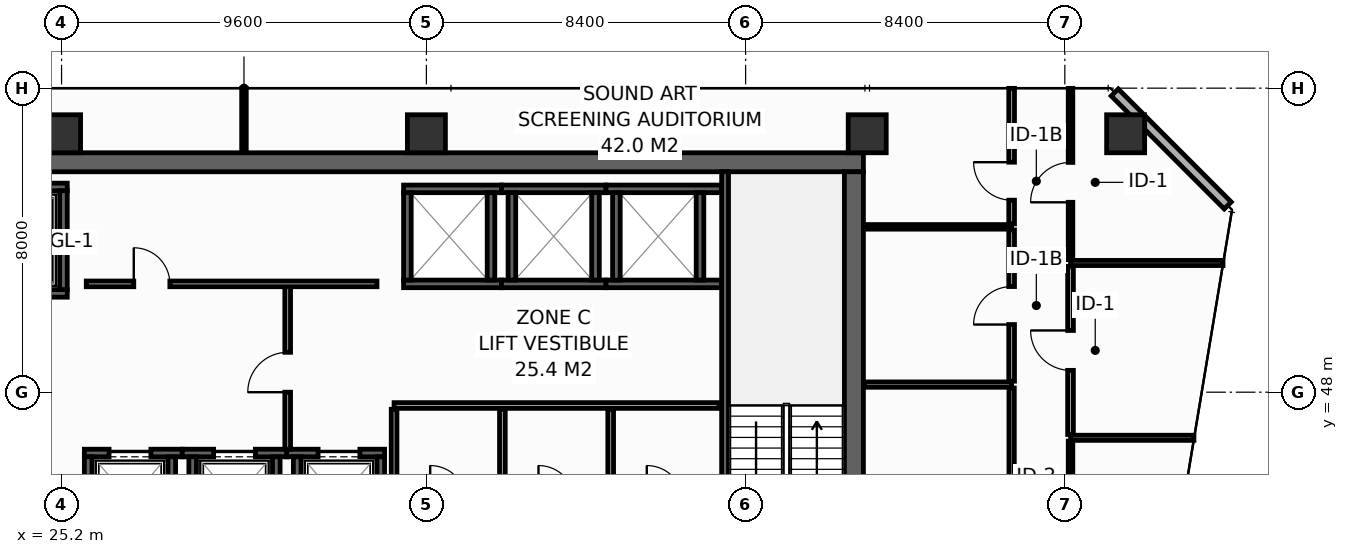
"""IFC4 building model, lengths in metres.
Left out: names, types, materials, properties, quantities, classifications, styles, units other than length and angle.
Written with IfcOpenShell. Run it as: python <this file> out.ifc"""

import sys

from ifc_helpers import new_model, si_unit, direction, frame, frame_2d, origin, origin_2d, place, context, subcontext, project, spatial, rectangle, hollow_rectangle, extrude, element, fill, save


model = new_model("IFC4")
c1 = context("Model", 3, precision=1e-05, world=origin(), true_north=direction((0.0, 1.0)))
c2 = subcontext(c1, "Body", "Model", "MODEL_VIEW")
j1 = project(units=[si_unit("LENGTHUNIT", "METRE"), si_unit("PLANEANGLEUNIT", "RADIAN")], contexts=[c1])
p1 = place(None, origin())
s1 = spatial("IfcSite", under=j1, at=p1, CompositionType="ELEMENT")
p2 = place(p1, origin())
s2 = spatial("IfcBuilding", under=s1, at=p2, CompositionType="ELEMENT")
p3 = place(p2, frame((0.0, 0.0, 144.8)))
s3 = spatial("IfcBuildingStorey", under=s2, at=p3, CompositionType="ELEMENT", Elevation=144.8)
p4 = place(p3, frame((13.6, 54.05, 0.0), z_axis=(0.0, 0.0, 1.0), x_axis=(1.0, 0.0, 0.0)))
e1 = element("IfcWall", 1, at=p4, inside=s3, PredefinedType="SHEAR", context=c2, shape_type="SweptSolid", body=[
    extrude(rectangle(XDim=32.7, YDim=0.5, at=frame_2d((16.35, 0.0))), origin(), (0.0, 0.0, 1.0), 3.55),
])
p5 = place(p3, frame((46.05, 43.4, 0.0), z_axis=(0.0, 0.0, 1.0), x_axis=(0.0, 1.0, 0.0)))
e2 = element("IfcWall", 2, at=p5, inside=s3, PredefinedType="SHEAR", context=c2, shape_type="SweptSolid", body=[
    extrude(rectangle(XDim=10.4, YDim=0.5, at=frame_2d((5.2, 0.0))), origin(), (0.0, 0.0, 1.0), 3.55),
])
for number, where, z_axis, x_axis in (
    (3, (25.2, 54.8, 0.0), (0.0, 0.0, 1.0), (1.0, 0.0, 0.0)),
    (4, (34.8, 54.8, 0.0), (0.0, 0.0, 1.0), (1.0, 0.0, 0.0)),
    (5, (46.4, 54.8, 0.0), (0.0, 0.0, 1.0), (1.0, 0.0, 0.0)),
    (6, (53.2, 54.8, 0.0), (0.0, 0.0, 1.0), (1.0, 0.0, 0.0)),
):
    element("IfcColumn", number, at=place(p3, frame(where, z_axis=z_axis, x_axis=x_axis)), inside=s3, PredefinedType="COLUMN", context=c2, shape_type="SweptSolid", body=[
        extrude(hollow_rectangle(XDim=1.0, YDim=1.0, WallThickness=0.045, at=origin_2d()), origin(), (0.0, 0.0, 1.0), 3.8),
    ])
p6 = place(p3, frame((22.5, 50.6, 0.0), z_axis=(0.0, 0.0, 1.0), x_axis=(1.0, 0.0, 0.0)))
e7 = element("IfcWall", 7, at=p6, inside=s3, PredefinedType="SHEAR", context=c2, shape_type="SweptSolid", body=[
    extrude(rectangle(XDim=2.85, YDim=0.2, at=frame_2d((1.425, 0.0))), origin(), (0.0, 0.0, 1.0), 3.55),
])
p7 = place(p6, frame((0.925, 0.0, 0.0)))
e8 = element("IfcOpeningElement", 8, at=p7, cuts=e7, PredefinedType="OPENING", context=c2, shape_type="SweptSolid", body=[
    extrude(rectangle(XDim=1.25, YDim=2.3, at=frame_2d((0.625, 1.15))), frame((0.0, 0.11, 0.0), z_axis=(0.0, -1.0, 0.0), x_axis=(1.0, 0.0, 0.0)), (0.0, 0.0, 1.0), 0.22),
])
p8 = place(p3, frame((22.5, 53.4, 0.0), z_axis=(0.0, 0.0, 1.0), x_axis=(1.0, 0.0, 0.0)))
e9 = element("IfcWall", 9, at=p8, inside=s3, PredefinedType="SHEAR", context=c2, shape_type="SweptSolid", body=[
    extrude(rectangle(XDim=2.85, YDim=0.2, at=frame_2d((1.425, 0.0))), origin(), (0.0, 0.0, 1.0), 3.55),
])
p9 = place(p3, frame((25.25, 50.7, 0.0), z_axis=(0.0, 0.0, 1.0), x_axis=(0.0, 1.0, 0.0)))
e10 = element("IfcWall", 10, at=p9, inside=s3, PredefinedType="SHEAR", context=c2, shape_type="SweptSolid", body=[
    extrude(rectangle(XDim=2.6, YDim=0.2, at=frame_2d((1.3, 0.0))), origin(), (0.0, 0.0, 1.0), 3.55),
])
p10 = place(p3, frame((25.8, 46.4, 0.0), z_axis=(0.0, 0.0, 1.0), x_axis=(1.0, 0.0, 0.0)))
e11 = element("IfcWall", 11, at=p10, inside=s3, PredefinedType="SHEAR", context=c2, shape_type="SweptSolid", body=[
    extrude(rectangle(XDim=2.575, YDim=0.2, at=frame_2d((1.288, 0.0))), origin(), (0.0, 0.0, 1.0), 3.55),
])
p11 = place(p10, frame((0.65, 0.0, 0.0)))
e12 = element("IfcOpeningElement", 12, at=p11, cuts=e11, PredefinedType="OPENING", context=c2, shape_type="SweptSolid", body=[
    extrude(rectangle(XDim=1.1, YDim=2.2, at=frame_2d((0.55, 1.1))), frame((0.0, 0.11, 0.0), z_axis=(0.0, -1.0, 0.0), x_axis=(1.0, 0.0, 0.0)), (0.0, 0.0, 1.0), 0.22),
])
for number, where, z_axis, x_axis in (
    (13, (25.9, 44.0, 0.0), (0.0, 0.0, 1.0), (0.0, 1.0, 0.0)),
    (14, (28.1, 44.0, 0.0), (0.0, 0.0, 1.0), (0.0, 1.0, 0.0)),
):
    element("IfcWall", number, at=place(p3, frame(where, z_axis=z_axis, x_axis=x_axis)), inside=s3, PredefinedType="SHEAR", context=c2, shape_type="SweptSolid", body=[
        extrude(rectangle(XDim=2.3, YDim=0.2, at=frame_2d((1.15, 0.0))), origin(), (0.0, 0.0, 1.0), 3.55),
    ])
p12 = place(p3, frame((28.375, 46.4, 0.0), z_axis=(0.0, 0.0, 1.0), x_axis=(1.0, 0.0, 0.0)))
e15 = element("IfcWall", 15, at=p12, inside=s3, PredefinedType="SHEAR", context=c2, shape_type="SweptSolid", body=[
    extrude(rectangle(XDim=2.75, YDim=0.2, at=frame_2d((1.375, 0.0))), origin(), (0.0, 0.0, 1.0), 3.55),
])
p13 = place(p12, frame((0.825, 0.0, 0.0)))
e16 = element("IfcOpeningElement", 16, at=p13, cuts=e15, PredefinedType="OPENING", context=c2, shape_type="SweptSolid", body=[
    extrude(rectangle(XDim=1.1, YDim=2.2, at=frame_2d((0.55, 1.1))), frame((0.0, 0.11, 0.0), z_axis=(0.0, -1.0, 0.0), x_axis=(1.0, 0.0, 0.0)), (0.0, 0.0, 1.0), 0.22),
])
for number, where, z_axis, x_axis in (
    (17, (28.65, 44.0, 0.0), (0.0, 0.0, 1.0), (0.0, 1.0, 0.0)),
    (18, (30.85, 44.0, 0.0), (0.0, 0.0, 1.0), (0.0, 1.0, 0.0)),
):
    element("IfcWall", number, at=place(p3, frame(where, z_axis=z_axis, x_axis=x_axis)), inside=s3, PredefinedType="SHEAR", context=c2, shape_type="SweptSolid", body=[
        extrude(rectangle(XDim=2.3, YDim=0.2, at=frame_2d((1.15, 0.0))), origin(), (0.0, 0.0, 1.0), 3.55),
    ])
p14 = place(p3, frame((31.125, 46.4, 0.0), z_axis=(0.0, 0.0, 1.0), x_axis=(1.0, 0.0, 0.0)))
e19 = element("IfcWall", 19, at=p14, inside=s3, PredefinedType="SHEAR", context=c2, shape_type="SweptSolid", body=[
    extrude(rectangle(XDim=2.575, YDim=0.2, at=frame_2d((1.288, 0.0))), origin(), (0.0, 0.0, 1.0), 3.55),
])
p15 = place(p14, frame((0.825, 0.0, 0.0)))
e20 = element("IfcOpeningElement", 20, at=p15, cuts=e19, PredefinedType="OPENING", context=c2, shape_type="SweptSolid", body=[
    extrude(rectangle(XDim=1.1, YDim=2.2, at=frame_2d((0.55, 1.1))), frame((0.0, 0.11, 0.0), z_axis=(0.0, -1.0, 0.0), x_axis=(1.0, 0.0, 0.0)), (0.0, 0.0, 1.0), 0.22),
])
for number, where, z_axis, x_axis in (
    (21, (31.4, 44.0, 0.0), (0.0, 0.0, 1.0), (0.0, 1.0, 0.0)),
    (22, (33.6, 44.0, 0.0), (0.0, 0.0, 1.0), (0.0, 1.0, 0.0)),
):
    element("IfcWall", number, at=place(p3, frame(where, z_axis=z_axis, x_axis=x_axis)), inside=s3, PredefinedType="SHEAR", context=c2, shape_type="SweptSolid", body=[
        extrude(rectangle(XDim=2.3, YDim=0.2, at=frame_2d((1.15, 0.0))), origin(), (0.0, 0.0, 1.0), 3.55),
    ])
for number, where, z_axis, x_axis in (
    (23, (34.2, 50.85, 0.0), (0.0, 0.0, 1.0), (1.0, 0.0, 0.0)),
    (24, (34.2, 53.35, 0.0), (0.0, 0.0, 1.0), (1.0, 0.0, 0.0)),
):
    element("IfcWall", number, at=place(p3, frame(where, z_axis=z_axis, x_axis=x_axis)), inside=s3, PredefinedType="SHEAR", context=c2, shape_type="SweptSolid", body=[
        extrude(rectangle(XDim=2.575, YDim=0.2, at=frame_2d((1.288, 0.0))), origin(), (0.0, 0.0, 1.0), 3.55),
    ])
for number, where, z_axis, x_axis in (
    (25, (34.3, 50.95, 0.0), (0.0, 0.0, 1.0), (0.0, 1.0, 0.0)),
    (26, (36.5, 50.95, 0.0), (0.0, 0.0, 1.0), (0.0, 1.0, 0.0)),
):
    element("IfcWall", number, at=place(p3, frame(where, z_axis=z_axis, x_axis=x_axis)), inside=s3, PredefinedType="SHEAR", context=c2, shape_type="SweptSolid", body=[
        extrude(rectangle(XDim=2.3, YDim=0.2, at=frame_2d((1.15, 0.0))), origin(), (0.0, 0.0, 1.0), 3.55),
    ])
for number, where, z_axis, x_axis in (
    (27, (36.775, 50.85, 0.0), (0.0, 0.0, 1.0), (1.0, 0.0, 0.0)),
    (28, (36.775, 53.35, 0.0), (0.0, 0.0, 1.0), (1.0, 0.0, 0.0)),
):
    element("IfcWall", number, at=place(p3, frame(where, z_axis=z_axis, x_axis=x_axis)), inside=s3, PredefinedType="SHEAR", context=c2, shape_type="SweptSolid", body=[
        extrude(rectangle(XDim=2.75, YDim=0.2, at=frame_2d((1.375, 0.0))), origin(), (0.0, 0.0, 1.0), 3.55),
    ])
for number, where, z_axis, x_axis in (
    (29, (37.05, 50.95, 0.0), (0.0, 0.0, 1.0), (0.0, 1.0, 0.0)),
    (30, (39.25, 50.95, 0.0), (0.0, 0.0, 1.0), (0.0, 1.0, 0.0)),
):
    element("IfcWall", number, at=place(p3, frame(where, z_axis=z_axis, x_axis=x_axis)), inside=s3, PredefinedType="SHEAR", context=c2, shape_type="SweptSolid", body=[
        extrude(rectangle(XDim=2.3, YDim=0.2, at=frame_2d((1.15, 0.0))), origin(), (0.0, 0.0, 1.0), 3.55),
    ])
for number, where, z_axis, x_axis in (
    (31, (39.525, 50.85, 0.0), (0.0, 0.0, 1.0), (1.0, 0.0, 0.0)),
    (32, (39.525, 53.35, 0.0), (0.0, 0.0, 1.0), (1.0, 0.0, 0.0)),
):
    element("IfcWall", number, at=place(p3, frame(where, z_axis=z_axis, x_axis=x_axis)), inside=s3, PredefinedType="SHEAR", context=c2, shape_type="SweptSolid", body=[
        extrude(rectangle(XDim=3.045, YDim=0.2, at=frame_2d((1.522, 0.0))), origin(), (0.0, 0.0, 1.0), 3.55),
    ])
for number, where, z_axis, x_axis in (
    (33, (39.8, 50.95, 0.0), (0.0, 0.0, 1.0), (0.0, 1.0, 0.0)),
    (34, (42.0, 50.95, 0.0), (0.0, 0.0, 1.0), (0.0, 1.0, 0.0)),
):
    element("IfcWall", number, at=place(p3, frame(where, z_axis=z_axis, x_axis=x_axis)), inside=s3, PredefinedType="SHEAR", context=c2, shape_type="SweptSolid", body=[
        extrude(rectangle(XDim=2.3, YDim=0.2, at=frame_2d((1.15, 0.0))), origin(), (0.0, 0.0, 1.0), 3.55),
    ])
p16 = place(p3, frame((42.66, 53.8, 0.0), z_axis=(0.0, 0.0, 1.0), x_axis=(0.0, -1.0, 0.0)))
e35 = element("IfcWall", 35, at=p16, inside=s3, PredefinedType="SHEAR", context=c2, shape_type="SweptSolid", body=[
    extrude(rectangle(XDim=10.4, YDim=0.18, at=frame_2d((5.2, 0.0))), origin(), (0.0, 0.0, 1.0), 3.55),
])
p17 = place(p16, frame((8.99, 0.0, 0.0)))
e36 = element("IfcOpeningElement", 36, at=p17, cuts=e35, PredefinedType="OPENING", context=c2, shape_type="SweptSolid", body=[
    extrude(rectangle(XDim=1.1, YDim=2.15, at=frame_2d((0.55, 1.075))), frame((0.0, 0.1, 0.0), z_axis=(0.0, -1.0, 0.0), x_axis=(1.0, 0.0, 0.0)), (0.0, 0.0, 1.0), 0.2),
])
p18 = place(p3, frame((31.15, 46.5, 0.0), z_axis=(0.0, 0.0, 1.0), x_axis=(0.0, 1.0, 0.0)))
e37 = element("IfcWall", 37, at=p18, inside=s3, PredefinedType="PARTITIONING", context=c2, shape_type="SweptSolid", body=[
    extrude(rectangle(XDim=4.35, YDim=0.15, at=frame_2d((2.175, 0.0))), origin(), (0.0, 0.0, 1.0), 3.55),
])
p19 = place(p18, frame((1.5, 0.0, 0.0)))
e38 = element("IfcOpeningElement", 38, at=p19, cuts=e37, PredefinedType="OPENING", context=c2, shape_type="SweptSolid", body=[
    extrude(rectangle(XDim=1.05, YDim=2.15, at=frame_2d((0.525, 1.075))), frame((0.0, 0.085, 0.0), z_axis=(0.0, -1.0, 0.0), x_axis=(1.0, 0.0, 0.0)), (0.0, 0.0, 1.0), 0.17),
])
p20 = place(p3, frame((33.95, 47.65, 0.0), z_axis=(0.0, 0.0, 1.0), x_axis=(1.0, 0.0, 0.0)))
e39 = element("IfcWall", 39, at=p20, inside=s3, PredefinedType="PARTITIONING", context=c2, shape_type="SweptSolid", body=[
    extrude(rectangle(XDim=8.55, YDim=0.15, at=frame_2d((4.275, 0.0))), origin(), (0.0, 0.0, 1.0), 3.55),
])
for number, where, z_axis, x_axis in (
    (40, (33.95, 45.22, 0.0), (0.0, 0.0, 1.0), (0.0, 1.0, 0.0)),
    (41, (36.8, 45.22, 0.0), (0.0, 0.0, 1.0), (0.0, 1.0, 0.0)),
    (42, (39.65, 45.22, 0.0), (0.0, 0.0, 1.0), (0.0, 1.0, 0.0)),
):
    element("IfcWall", number, at=place(p3, frame(where, z_axis=z_axis, x_axis=x_axis)), inside=s3, PredefinedType="PARTITIONING", context=c2, shape_type="SweptSolid", body=[
        extrude(rectangle(XDim=2.33, YDim=0.15, at=frame_2d((1.165, 0.0))), origin(), (0.0, 0.0, 1.0), 3.55),
    ])
p21 = place(p3, frame((25.85, 50.85, 0.0), z_axis=(0.0, 0.0, 1.0), x_axis=(1.0, 0.0, 0.0)))
e43 = element("IfcWall", 43, at=p21, inside=s3, PredefinedType="PARTITIONING", context=c2, shape_type="SweptSolid", body=[
    extrude(rectangle(XDim=7.65, YDim=0.15, at=frame_2d((3.825, 0.0))), origin(), (0.0, 0.0, 1.0), 3.55),
])
p22 = place(p21, frame((1.25, 0.0, 0.0)))
e44 = element("IfcOpeningElement", 44, at=p22, cuts=e43, PredefinedType="OPENING", context=c2, shape_type="SweptSolid", body=[
    extrude(rectangle(XDim=0.95, YDim=2.15, at=frame_2d((0.475, 1.075))), frame((0.0, 0.085, 0.0), z_axis=(0.0, -1.0, 0.0), x_axis=(1.0, 0.0, 0.0)), (0.0, 0.0, 1.0), 0.17),
])
p23 = place(p3, frame((55.887, 52.913, 0.0), z_axis=(0.0, 0.0, 1.0), x_axis=(-0.707106781187, 0.707106781187, 0.0)))
e45 = element("IfcWall", 45, at=p23, inside=s3, PredefinedType="STANDARD", context=c2, shape_type="SweptSolid", body=[
    extrude(rectangle(XDim=4.206, YDim=0.26, at=frame_2d((2.103, 0.0))), origin(), (0.0, 0.0, 1.0), 3.55),
])
p24 = place(p3, frame((46.32, 48.2, 0.0), z_axis=(0.0, 0.0, 1.0), x_axis=(1.0, 0.0, 0.0)))
e46 = element("IfcWall", 46, at=p24, inside=s3, PredefinedType="PARTITIONING", context=c2, shape_type="SweptSolid", body=[
    extrude(rectangle(XDim=3.88, YDim=0.14, at=frame_2d((1.94, 0.0))), origin(), (0.0, 0.0, 1.0), 3.55),
])
p25 = place(p3, frame((50.2, 41.04, 0.0), z_axis=(0.0, 0.0, 1.0), x_axis=(0.0, 1.0, 0.0)))
e47 = element("IfcWall", 47, at=p25, inside=s3, PredefinedType="PARTITIONING", context=c2, shape_type="SweptSolid", body=[
    extrude(rectangle(XDim=7.07, YDim=0.14, at=frame_2d((3.535, 0.0))), origin(), (0.0, 0.0, 1.0), 2.835),
])
p26 = place(p25, frame((3.085, 0.0, 0.0)))
e48 = element("IfcOpeningElement", 48, at=p26, cuts=e47, PredefinedType="OPENING", context=c2, shape_type="SweptSolid", body=[
    extrude(rectangle(XDim=0.9, YDim=2.1, at=frame_2d((0.45, 1.05))), frame((0.0, 0.08, 0.0), z_axis=(0.0, -1.0, 0.0), x_axis=(1.0, 0.0, 0.0)), (0.0, 0.0, 1.0), 0.16),
])
p27 = place(p3, frame((46.32, 52.35, 0.0), z_axis=(0.0, 0.0, 1.0), x_axis=(1.0, 0.0, 0.0)))
e49 = element("IfcWall", 49, at=p27, inside=s3, PredefinedType="PARTITIONING", context=c2, shape_type="SweptSolid", body=[
    extrude(rectangle(XDim=3.88, YDim=0.12, at=frame_2d((1.94, 0.0))), origin(), (0.0, 0.0, 1.0), 3.55),
])
p28 = place(p3, frame((30.0, 54.32, 0.0), z_axis=(0.0, 0.0, 1.0), x_axis=(0.0, 1.0, 0.0)))
e50 = element("IfcWall", 50, at=p28, inside=s3, PredefinedType="PARTITIONING", context=c2, shape_type="SweptSolid", body=[
    extrude(rectangle(XDim=1.675, YDim=0.12, at=frame_2d((0.837, 0.0))), origin(), (0.0, 0.0, 1.0), 2.935),
])
p29 = place(p3, frame((50.2, 48.29, 0.0), z_axis=(0.0, 0.0, 1.0), x_axis=(0.0, 1.0, 0.0)))
e51 = element("IfcWall", 51, at=p29, inside=s3, PredefinedType="PARTITIONING", context=c2, shape_type="SweptSolid", body=[
    extrude(rectangle(XDim=3.98, YDim=0.15, at=frame_2d((1.99, 0.0))), origin(), (0.0, 0.0, 1.0), 3.55),
])
p30 = place(p29, frame((1.49, 0.0, 0.0)))
e52 = element("IfcOpeningElement", 52, at=p30, cuts=e51, PredefinedType="OPENING", context=c2, shape_type="SweptSolid", body=[
    extrude(rectangle(XDim=1.0, YDim=2.15, at=frame_2d((0.5, 1.075))), frame((0.0, 0.085, 0.0), z_axis=(0.0, -1.0, 0.0), x_axis=(1.0, 0.0, 0.0)), (0.0, 0.0, 1.0), 0.17),
])
p31 = place(p3, frame((50.2, 52.43, 0.0), z_axis=(0.0, 0.0, 1.0), x_axis=(0.0, 1.0, 0.0)))
e53 = element("IfcWall", 53, at=p31, inside=s3, PredefinedType="PARTITIONING", context=c2, shape_type="SweptSolid", body=[
    extrude(rectangle(XDim=3.565, YDim=0.15, at=frame_2d((1.783, 0.0))), origin(), (0.0, 0.0, 1.0), 2.935),
])
p32 = place(p31, frame((0.622, 0.0, 0.0)))
e54 = element("IfcOpeningElement", 54, at=p32, cuts=e53, PredefinedType="OPENING", context=c2, shape_type="SweptSolid", body=[
    extrude(rectangle(XDim=1.0, YDim=2.15, at=frame_2d((0.5, 1.075))), frame((0.0, 0.085, 0.0), z_axis=(0.0, -1.0, 0.0), x_axis=(1.0, 0.0, 0.0)), (0.0, 0.0, 1.0), 0.17),
])
p33 = place(p3, frame((51.75, 46.8, 0.0), z_axis=(0.0, 0.0, 1.0), x_axis=(1.0, 0.0, 0.0)))
e55 = element("IfcWall", 55, at=p33, inside=s3, PredefinedType="PARTITIONING", context=c2, shape_type="SweptSolid", body=[
    extrude(rectangle(XDim=3.247, YDim=0.135, at=frame_2d((1.624, 0.0))), origin(), (0.0, 0.0, 1.0), 2.835),
])
p34 = place(p3, frame((51.75, 51.4, 0.0), z_axis=(0.0, 0.0, 1.0), x_axis=(1.0, 0.0, 0.0)))
e56 = element("IfcWall", 56, at=p34, inside=s3, PredefinedType="PARTITIONING", context=c2, shape_type="SweptSolid", body=[
    extrude(rectangle(XDim=4.012, YDim=0.135, at=frame_2d((2.006, 0.0))), origin(), (0.0, 0.0, 1.0), 2.835),
])
p35 = place(p3, frame((51.75, 41.038, 0.0), z_axis=(0.0, 0.0, 1.0), x_axis=(0.0, 1.0, 0.0)))
e57 = element("IfcWall", 57, at=p35, inside=s3, PredefinedType="PARTITIONING", context=c2, shape_type="SweptSolid", body=[
    extrude(rectangle(XDim=5.675, YDim=0.12, at=frame_2d((2.837, 0.0))), origin(), (0.0, 0.0, 1.0), 2.835),
])
p36 = place(p35, frame((2.387, 0.0, 0.0)))
e58 = element("IfcOpeningElement", 58, at=p36, cuts=e57, PredefinedType="OPENING", context=c2, shape_type="SweptSolid", body=[
    extrude(rectangle(XDim=0.9, YDim=2.1, at=frame_2d((0.45, 1.05))), frame((0.0, 0.07, 0.0), z_axis=(0.0, -1.0, 0.0), x_axis=(1.0, 0.0, 0.0)), (0.0, 0.0, 1.0), 0.14),
])
p37 = place(p3, frame((51.75, 46.887, 0.0), z_axis=(0.0, 0.0, 1.0), x_axis=(0.0, 1.0, 0.0)))
e59 = element("IfcWall", 59, at=p37, inside=s3, PredefinedType="PARTITIONING", context=c2, shape_type="SweptSolid", body=[
    extrude(rectangle(XDim=4.425, YDim=0.15, at=frame_2d((2.212, 0.0))), origin(), (0.0, 0.0, 1.0), 3.55),
])
p38 = place(p37, frame((1.687, 0.0, 0.0)))
e60 = element("IfcOpeningElement", 60, at=p38, cuts=e59, PredefinedType="OPENING", context=c2, shape_type="SweptSolid", body=[
    extrude(rectangle(XDim=1.05, YDim=2.15, at=frame_2d((0.525, 1.075))), frame((0.0, 0.085, 0.0), z_axis=(0.0, -1.0, 0.0), x_axis=(1.0, 0.0, 0.0)), (0.0, 0.0, 1.0), 0.17),
])
p39 = place(p3, frame((51.75, 51.488, 0.0), z_axis=(0.0, 0.0, 1.0), x_axis=(0.0, 1.0, 0.0)))
e61 = element("IfcWall", 61, at=p39, inside=s3, PredefinedType="PARTITIONING", context=c2, shape_type="SweptSolid", body=[
    extrude(rectangle(XDim=4.508, YDim=0.12, at=frame_2d((2.254, 0.0))), origin(), (0.0, 0.0, 1.0), 2.935),
])
p40 = place(p39, frame((1.509, 0.0, 0.0)))
e62 = element("IfcOpeningElement", 62, at=p40, cuts=e61, PredefinedType="OPENING", context=c2, shape_type="SweptSolid", body=[
    extrude(rectangle(XDim=1.05, YDim=2.15, at=frame_2d((0.525, 1.075))), frame((0.0, 0.07, 0.0), z_axis=(0.0, -1.0, 0.0), x_axis=(1.0, 0.0, 0.0)), (0.0, 0.0, 1.0), 0.14),
])
p41 = place(p11, origin())
e63 = element("IfcDoor", 63, at=p41, inside=s3, OperationType="SLIDING_TO_LEFT", PredefinedType="DOOR", context=c2, shape_type="SweptSolid", body=[
    extrude(rectangle(XDim=1.1, YDim=2.2, at=frame_2d((0.55, 1.1))), frame((0.0, 0.025, 0.0), z_axis=(0.0, -1.0, 0.0), x_axis=(1.0, 0.0, 0.0)), (0.0, 0.0, 1.0), 0.05),
])
fill(e12, e63)
p42 = place(p13, origin())
e64 = element("IfcDoor", 64, at=p42, inside=s3, OperationType="SLIDING_TO_LEFT", PredefinedType="DOOR", context=c2, shape_type="SweptSolid", body=[
    extrude(rectangle(XDim=1.1, YDim=2.2, at=frame_2d((0.55, 1.1))), frame((0.0, 0.025, 0.0), z_axis=(0.0, -1.0, 0.0), x_axis=(1.0, 0.0, 0.0)), (0.0, 0.0, 1.0), 0.05),
])
fill(e16, e64)
p43 = place(p15, origin())
e65 = element("IfcDoor", 65, at=p43, inside=s3, OperationType="SLIDING_TO_LEFT", PredefinedType="DOOR", context=c2, shape_type="SweptSolid", body=[
    extrude(rectangle(XDim=1.1, YDim=2.2, at=frame_2d((0.55, 1.1))), frame((0.0, 0.025, 0.0), z_axis=(0.0, -1.0, 0.0), x_axis=(1.0, 0.0, 0.0)), (0.0, 0.0, 1.0), 0.05),
])
fill(e20, e65)
p44 = place(p19, origin())
e66 = element("IfcDoor", 66, at=p44, inside=s3, OperationType="SINGLE_SWING_LEFT", PredefinedType="DOOR", context=c2, shape_type="SweptSolid", body=[
    extrude(rectangle(XDim=1.05, YDim=2.15, at=frame_2d((0.525, 1.075))), frame((0.0, 0.025, 0.0), z_axis=(0.0, -1.0, 0.0), x_axis=(1.0, 0.0, 0.0)), (0.0, 0.0, 1.0), 0.05),
])
fill(e38, e66)
p45 = place(p22, origin())
e67 = element("IfcDoor", 67, at=p45, inside=s3, OperationType="SINGLE_SWING_LEFT", PredefinedType="DOOR", context=c2, shape_type="SweptSolid", body=[
    extrude(rectangle(XDim=0.95, YDim=2.15, at=frame_2d((0.475, 1.075))), frame((0.0, 0.025, 0.0), z_axis=(0.0, -1.0, 0.0), x_axis=(1.0, 0.0, 0.0)), (0.0, 0.0, 1.0), 0.05),
])
fill(e44, e67)
p46 = place(p30, origin())
e68 = element("IfcDoor", 68, at=p46, inside=s3, OperationType="SINGLE_SWING_LEFT", PredefinedType="DOOR", context=c2, shape_type="SweptSolid", body=[
    extrude(rectangle(XDim=1.0, YDim=2.15, at=frame_2d((0.5, 1.075))), frame((0.0, 0.025, 0.0), z_axis=(0.0, -1.0, 0.0), x_axis=(1.0, 0.0, 0.0)), (0.0, 0.0, 1.0), 0.05),
])
fill(e52, e68)
p47 = place(p32, origin())
e69 = element("IfcDoor", 69, at=p47, inside=s3, OperationType="SINGLE_SWING_RIGHT", PredefinedType="DOOR", context=c2, shape_type="SweptSolid", body=[
    extrude(rectangle(XDim=1.0, YDim=2.15, at=frame_2d((0.5, 1.075))), frame((0.0, 0.025, 0.0), z_axis=(0.0, -1.0, 0.0), x_axis=(1.0, 0.0, 0.0)), (0.0, 0.0, 1.0), 0.05),
])
fill(e54, e69)
p48 = place(p38, origin())
e70 = element("IfcDoor", 70, at=p48, inside=s3, OperationType="SINGLE_SWING_RIGHT", PredefinedType="DOOR", context=c2, shape_type="SweptSolid", body=[
    extrude(rectangle(XDim=1.05, YDim=2.15, at=frame_2d((0.525, 1.075))), frame((0.0, 0.025, 0.0), z_axis=(0.0, -1.0, 0.0), x_axis=(1.0, 0.0, 0.0)), (0.0, 0.0, 1.0), 0.05),
])
fill(e60, e70)
p49 = place(p40, origin())
e71 = element("IfcDoor", 71, at=p49, inside=s3, OperationType="SINGLE_SWING_LEFT", PredefinedType="DOOR", context=c2, shape_type="SweptSolid", body=[
    extrude(rectangle(XDim=1.05, YDim=2.15, at=frame_2d((0.525, 1.075))), frame((0.0, 0.025, 0.0), z_axis=(0.0, -1.0, 0.0), x_axis=(1.0, 0.0, 0.0)), (0.0, 0.0, 1.0), 0.05),
])
fill(e62, e71)
save(model, sys.argv[1])
